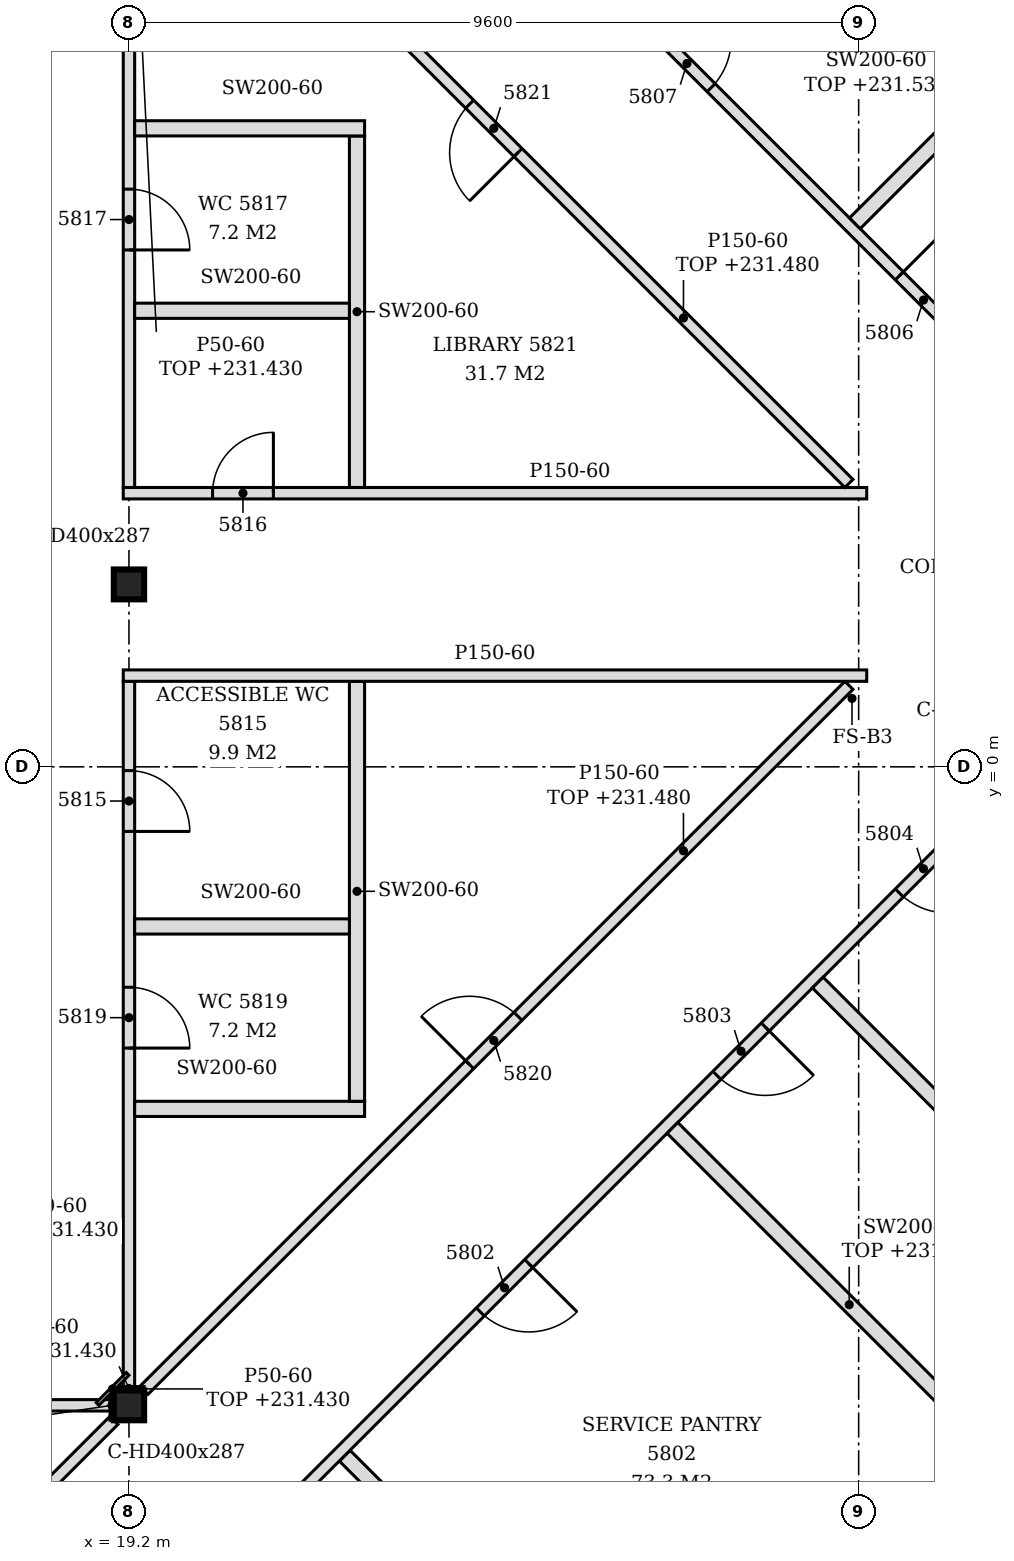
"""IFC4 building model, lengths in metres.
Left out: names, types, materials, properties, quantities, classifications, styles, units other than length and angle.
Written with IfcOpenShell. Run it as: python <this file> out.ifc"""

import sys

from ifc_helpers import new_model, si_unit, direction, frame, frame_2d, origin, origin_2d, place, context, subcontext, project, spatial, polyline, rectangle, i_section, outline, extrude, element, fill, save


model = new_model("IFC4")
c1 = context("Model", 3, precision=1e-05, world=origin(), true_north=direction((0.0, 1.0)))
c2 = subcontext(c1, "Body", "Model", "MODEL_VIEW")
j1 = project(units=[si_unit("LENGTHUNIT", "METRE"), si_unit("PLANEANGLEUNIT", "RADIAN")], contexts=[c1])
p1 = place(None, origin())
s1 = spatial("IfcSite", under=j1, at=p1, CompositionType="ELEMENT")
p2 = place(p1, origin())
s2 = spatial("IfcBuilding", under=s1, at=p2, CompositionType="ELEMENT")
p3 = place(p2, frame((0.0, 0.0, 228.6)))
s3 = spatial("IfcBuildingStorey", under=s2, at=p3, CompositionType="ELEMENT", Elevation=228.6)
for number, where, z_axis, x_axis in (
    (1, (19.2, -8.4, -0.15), (0.0, 0.0, 1.0), (1.0, 0.0, 0.0)),
    (2, (19.2, 2.4, -0.15), (0.0, 0.0, 1.0), (1.0, 0.0, 0.0)),
):
    element("IfcColumn", number, at=place(p3, frame(where, z_axis=z_axis, x_axis=x_axis)), inside=s3, PredefinedType="COLUMN", context=c2, shape_type="SweptSolid", body=[
        extrude(i_section(OverallWidth=0.399, OverallDepth=0.393, WebThickness=0.023, FlangeThickness=0.037, FilletRadius=0.015, at=origin_2d()), origin(), (0.0, 0.0, 1.0), 3.6),
    ])
p4 = place(p3, frame((29.636, -16.66, 0.0), z_axis=(0.0, 0.0, 1.0), x_axis=(-0.707095420673, 0.707118141518, 0.0)))
e3 = element("IfcWall", 3, at=p4, inside=s3, PredefinedType="PARTITIONING", context=c2, shape_type="SweptSolid", body=[
    extrude(rectangle(XDim=10.745, YDim=0.2, at=frame_2d((5.373, 0.0))), origin(), (0.0, 0.0, 1.0), 2.88),
])
p5 = place(p3, frame((16.722, -14.272, 0.0), z_axis=(0.0, 0.0, 1.0), x_axis=(0.707106781187, 0.707106781187, 0.0)))
e4 = element("IfcWall", 4, at=p5, inside=s3, PredefinedType="PARTITIONING", context=c2, shape_type="SweptSolid", body=[
    extrude(rectangle(XDim=20.049, YDim=0.15, at=frame_2d((10.025, 0.0))), origin(), (0.0, 0.0, 1.0), 2.73),
])
p6 = place(p5, frame((4.892, 0.0, 0.0)))
e5 = element("IfcOpeningElement", 5, at=p6, cuts=e4, PredefinedType="OPENING", context=c2, shape_type="SweptSolid", body=[
    extrude(rectangle(XDim=0.9, YDim=2.1, at=frame_2d((0.45, 1.05))), frame((0.0, 0.085, 0.0), z_axis=(0.0, -1.0, 0.0), x_axis=(1.0, 0.0, 0.0)), (0.0, 0.0, 1.0), 0.17),
])
p7 = place(p5, frame((10.042, 0.0, 0.0)))
e6 = element("IfcOpeningElement", 6, at=p7, cuts=e4, PredefinedType="OPENING", context=c2, shape_type="SweptSolid", body=[
    extrude(rectangle(XDim=0.9, YDim=2.1, at=frame_2d((0.45, 1.05))), frame((0.0, 0.085, 0.0), z_axis=(0.0, -1.0, 0.0), x_axis=(1.0, 0.0, 0.0)), (0.0, 0.0, 1.0), 0.17),
])
p8 = place(p5, frame((14.443, 0.0, 0.0)))
e7 = element("IfcOpeningElement", 7, at=p8, cuts=e4, PredefinedType="OPENING", context=c2, shape_type="SweptSolid", body=[
    extrude(rectangle(XDim=0.9, YDim=2.1, at=frame_2d((0.45, 1.05))), frame((0.0, 0.085, 0.0), z_axis=(0.0, -1.0, 0.0), x_axis=(1.0, 0.0, 0.0)), (0.0, 0.0, 1.0), 0.17),
])
p9 = place(p5, frame((17.837, 0.0, 0.0)))
e8 = element("IfcOpeningElement", 8, at=p9, cuts=e4, PredefinedType="OPENING", context=c2, shape_type="SweptSolid", body=[
    extrude(rectangle(XDim=0.9, YDim=2.1, at=frame_2d((0.45, 1.05))), frame((0.0, 0.085, 0.0), z_axis=(0.0, -1.0, 0.0), x_axis=(1.0, 0.0, 0.0)), (0.0, 0.0, 1.0), 0.17),
])
p10 = place(p3, frame((15.728, -11.872, 0.0), z_axis=(0.0, 0.0, 1.0), x_axis=(0.707080416772, 0.707133144618, 0.0)))
e9 = element("IfcWall", 9, at=p10, inside=s3, PredefinedType="PARTITIONING", context=c2, shape_type="SweptSolid", body=[
    extrude(rectangle(XDim=4.63, YDim=0.15, at=frame_2d((2.315, 0.0))), origin(), (0.0, 0.0, 1.0), 3.45),
])
p11 = place(p3, frame((35.86, -10.436, 0.0), z_axis=(0.0, 0.0, 1.0), x_axis=(-0.707106781187, 0.707106781187, 0.0)))
e10 = element("IfcWall", 10, at=p11, inside=s3, PredefinedType="PARTITIONING", context=c2, shape_type="SweptSolid", body=[
    extrude(rectangle(XDim=10.745, YDim=0.2, at=frame_2d((5.373, 0.0))), origin(), (0.0, 0.0, 1.0), 2.88),
])
p12 = place(p3, frame((31.002, -9.402, 0.0), z_axis=(0.0, 0.0, 1.0), x_axis=(-0.707088226093, 0.707125335793, 0.0)))
e11 = element("IfcWall", 11, at=p12, inside=s3, PredefinedType="PARTITIONING", context=c2, shape_type="SweptSolid", body=[
    extrude(rectangle(XDim=6.579, YDim=0.2, at=frame_2d((3.29, 0.0))), origin(), (0.0, 0.0, 1.0), 2.88),
])
p13 = place(p3, frame((7.399, -8.4, 0.0), z_axis=(0.0, 0.0, 1.0), x_axis=(1.0, 0.0, 0.0)))
e12 = element("IfcWall", 12, at=p13, inside=s3, PredefinedType="PARTITIONING", context=c2, shape_type="SweptSolid", body=[
    extrude(rectangle(XDim=11.601, YDim=0.15, at=frame_2d((5.801, 0.0))), origin(), (0.0, 0.0, 1.0), 2.83),
])
p14 = place(p13, frame((5.351, 0.0, 0.0)))
e13 = element("IfcOpeningElement", 13, at=p14, cuts=e12, PredefinedType="OPENING", context=c2, shape_type="SweptSolid", body=[
    extrude(rectangle(XDim=0.9, YDim=2.1, at=frame_2d((0.45, 1.05))), frame((0.0, 0.085, 0.0), z_axis=(0.0, -1.0, 0.0), x_axis=(1.0, 0.0, 0.0)), (0.0, 0.0, 1.0), 0.17),
])
p15 = place(p3, frame((19.2, -8.204, 0.0), z_axis=(0.0, 0.0, 1.0), x_axis=(0.0, 1.0, 0.0)))
e14 = element("IfcWall", 14, at=p15, inside=s3, PredefinedType="PARTITIONING", context=c2, shape_type="SweptSolid", body=[
    extrude(rectangle(XDim=9.329, YDim=0.15, at=frame_2d((4.664, 0.0))), origin(), (0.0, 0.0, 1.0), 2.83),
])
p16 = place(p15, frame((7.354, 0.0, 0.0)))
e15 = element("IfcOpeningElement", 15, at=p16, cuts=e14, PredefinedType="OPENING", context=c2, shape_type="SweptSolid", body=[
    extrude(rectangle(XDim=0.8, YDim=2.1, at=frame_2d((0.4, 1.05))), frame((0.0, 0.085, 0.0), z_axis=(0.0, -1.0, 0.0), x_axis=(1.0, 0.0, 0.0)), (0.0, 0.0, 1.0), 0.17),
])
p17 = place(p15, frame((4.503, 0.0, 0.0)))
e16 = element("IfcOpeningElement", 16, at=p17, cuts=e14, PredefinedType="OPENING", context=c2, shape_type="SweptSolid", body=[
    extrude(rectangle(XDim=0.8, YDim=2.1, at=frame_2d((0.4, 1.05))), frame((0.0, 0.085, 0.0), z_axis=(0.0, -1.0, 0.0), x_axis=(1.0, 0.0, 0.0)), (0.0, 0.0, 1.0), 0.17),
])
p18 = place(p3, frame((19.398, -8.202, 0.0), z_axis=(0.0, 0.0, 1.0), x_axis=(0.707116088468, 0.707097473782, 0.0)))
e17 = element("IfcWall", 17, at=p18, inside=s3, PredefinedType="PARTITIONING", context=c2, shape_type="SweptSolid", body=[
    extrude(rectangle(XDim=13.115, YDim=0.15, at=frame_2d((6.558, 0.0))), origin(), (0.0, 0.0, 1.0), 2.88),
])
p19 = place(p18, frame((6.058, 0.0, 0.0)))
e18 = element("IfcOpeningElement", 18, at=p19, cuts=e17, PredefinedType="OPENING", context=c2, shape_type="SweptSolid", body=[
    extrude(rectangle(XDim=0.9, YDim=2.1, at=frame_2d((0.45, 1.05))), frame((0.0, 0.085, 0.0), z_axis=(0.0, -1.0, 0.0), x_axis=(1.0, 0.0, 0.0)), (0.0, 0.0, 1.0), 0.17),
])
p20 = place(p3, frame((19.275, -4.5, 0.0), z_axis=(0.0, 0.0, 1.0), x_axis=(1.0, 0.0, 0.0)))
e19 = element("IfcWall", 19, at=p20, inside=s3, PredefinedType="PARTITIONING", context=c2, shape_type="SweptSolid", body=[
    extrude(outline(polyline([(0.0, 0.0), (3.025, 0.0), (3.025, 3.45), (0.075, 3.45), (0.073, 2.83), (0.0, 2.83), (0.0, 0.0)])), frame((0.0, 0.1, 0.0), z_axis=(0.0, -1.0, 0.0), x_axis=(1.0, 0.0, 0.0)), (0.0, 0.0, 1.0), 0.2),
])
p21 = place(p3, frame((22.2, -4.4, 0.0), z_axis=(0.0, 0.0, 1.0), x_axis=(0.0, 1.0, 0.0)))
e20 = element("IfcWall", 20, at=p21, inside=s3, PredefinedType="PARTITIONING", context=c2, shape_type="SweptSolid", body=[
    extrude(outline(polyline([(0.0, 0.0), (5.525, 0.0), (5.525, 3.45), (4.505, 3.45), (4.503, 2.88), (4.295, 2.88), (4.293, 3.45), (0.0, 3.45), (0.0, 0.0)])), frame((0.0, 0.1, 0.0), z_axis=(0.0, -1.0, 0.0), x_axis=(1.0, 0.0, 0.0)), (0.0, 0.0, 1.0), 0.2),
])
p22 = place(p3, frame((19.275, -2.1, 0.0), z_axis=(0.0, 0.0, 1.0), x_axis=(1.0, 0.0, 0.0)))
e21 = element("IfcWall", 21, at=p22, inside=s3, PredefinedType="PARTITIONING", context=c2, shape_type="SweptSolid", body=[
    extrude(outline(polyline([(0.0, 0.0), (2.825, 0.0), (2.825, 3.45), (0.075, 3.45), (0.073, 2.83), (0.0, 2.83), (0.0, 0.0)])), frame((0.0, 0.1, 0.0), z_axis=(0.0, -1.0, 0.0), x_axis=(1.0, 0.0, 0.0)), (0.0, 0.0, 1.0), 0.2),
])
p23 = place(p3, frame((19.125, 1.2, 0.0), z_axis=(0.0, 0.0, 1.0), x_axis=(1.0, 0.0, 0.0)))
e22 = element("IfcWall", 22, at=p23, inside=s3, PredefinedType="PARTITIONING", context=c2, shape_type="SweptSolid", body=[
    extrude(outline(polyline([(0.0, 0.0), (9.781, 0.0), (9.781, 3.45), (0.225, 3.45), (0.223, 2.83), (0.0, 2.83), (0.0, 0.0)])), frame((0.0, 0.075, 0.0), z_axis=(0.0, -1.0, 0.0), x_axis=(1.0, 0.0, 0.0)), (0.0, 0.0, 1.0), 0.15),
])
p24 = place(p3, frame((33.341, 2.453, 0.0), z_axis=(0.0, 0.0, 1.0), x_axis=(-0.707098652635, 0.707114909645, 0.0)))
e23 = element("IfcWall", 23, at=p24, inside=s3, PredefinedType="PARTITIONING", context=c2, shape_type="SweptSolid", body=[
    extrude(rectangle(XDim=15.018, YDim=0.15, at=frame_2d((7.509, 0.0))), origin(), (0.0, 0.0, 1.0), 2.88),
])
p25 = place(p24, frame((4.766, 0.0, 0.0)))
e24 = element("IfcOpeningElement", 24, at=p25, cuts=e23, PredefinedType="OPENING", context=c2, shape_type="SweptSolid", body=[
    extrude(rectangle(XDim=0.9, YDim=2.1, at=frame_2d((0.45, 1.05))), frame((0.0, 0.085, 0.0), z_axis=(0.0, -1.0, 0.0), x_axis=(1.0, 0.0, 0.0)), (0.0, 0.0, 1.0), 0.17),
])
p26 = place(p24, frame((9.167, 0.0, 0.0)))
e25 = element("IfcOpeningElement", 25, at=p26, cuts=e23, PredefinedType="OPENING", context=c2, shape_type="SweptSolid", body=[
    extrude(rectangle(XDim=0.9, YDim=2.1, at=frame_2d((0.45, 1.05))), frame((0.0, 0.085, 0.0), z_axis=(0.0, -1.0, 0.0), x_axis=(1.0, 0.0, 0.0)), (0.0, 0.0, 1.0), 0.17),
])
p27 = place(p24, frame((13.482, 0.0, 0.0)))
e26 = element("IfcOpeningElement", 26, at=p27, cuts=e23, PredefinedType="OPENING", context=c2, shape_type="SweptSolid", body=[
    extrude(rectangle(XDim=0.9, YDim=2.1, at=frame_2d((0.45, 1.05))), frame((0.0, 0.085, 0.0), z_axis=(0.0, -1.0, 0.0), x_axis=(1.0, 0.0, 0.0)), (0.0, 0.0, 1.0), 0.17),
])
p28 = place(p3, frame((19.125, 3.6, 0.0), z_axis=(0.0, 0.0, 1.0), x_axis=(1.0, 0.0, 0.0)))
e27 = element("IfcWall", 27, at=p28, inside=s3, PredefinedType="PARTITIONING", context=c2, shape_type="SweptSolid", body=[
    extrude(outline(polyline([(0.0, 0.0), (9.781, 0.0), (9.781, 3.45), (0.225, 3.45), (0.223, 2.83), (0.0, 2.83), (0.0, 0.0)])), frame((0.0, 0.075, 0.0), z_axis=(0.0, -1.0, 0.0), x_axis=(1.0, 0.0, 0.0)), (0.0, 0.0, 1.0), 0.15),
])
p29 = place(p28, frame((1.175, 0.0, 0.0)))
e28 = element("IfcOpeningElement", 28, at=p29, cuts=e27, PredefinedType="OPENING", context=c2, shape_type="SweptSolid", body=[
    extrude(rectangle(XDim=0.8, YDim=2.1, at=frame_2d((0.4, 1.05))), frame((0.0, 0.085, 0.0), z_axis=(0.0, -1.0, 0.0), x_axis=(1.0, 0.0, 0.0)), (0.0, 0.0, 1.0), 0.17),
])
p30 = place(p3, frame((19.2, 3.675, 0.0), z_axis=(0.0, 0.0, 1.0), x_axis=(0.0, 1.0, 0.0)))
e29 = element("IfcWall", 29, at=p30, inside=s3, PredefinedType="PARTITIONING", context=c2, shape_type="SweptSolid", body=[
    extrude(rectangle(XDim=9.328, YDim=0.15, at=frame_2d((4.664, 0.0))), origin(), (0.0, 0.0, 1.0), 2.83),
])
p31 = place(p30, frame((3.125, 0.0, 0.0)))
e30 = element("IfcOpeningElement", 30, at=p31, cuts=e29, PredefinedType="OPENING", context=c2, shape_type="SweptSolid", body=[
    extrude(rectangle(XDim=0.8, YDim=2.1, at=frame_2d((0.4, 1.05))), frame((0.0, 0.085, 0.0), z_axis=(0.0, -1.0, 0.0), x_axis=(1.0, 0.0, 0.0)), (0.0, 0.0, 1.0), 0.17),
])
p32 = place(p3, frame((22.2, 3.675, 0.0), z_axis=(0.0, 0.0, 1.0), x_axis=(0.0, 1.0, 0.0)))
e31 = element("IfcWall", 31, at=p32, inside=s3, PredefinedType="PARTITIONING", context=c2, shape_type="SweptSolid", body=[
    extrude(outline(polyline([(0.0, 0.0), (4.625, 0.0), (4.625, 3.45), (1.23, 3.45), (1.228, 2.88), (1.02, 2.88), (1.018, 3.45), (0.0, 3.45), (0.0, 0.0)])), frame((0.0, 0.1, 0.0), z_axis=(0.0, -1.0, 0.0), x_axis=(1.0, 0.0, 0.0)), (0.0, 0.0, 1.0), 0.2),
])
p33 = place(p3, frame((28.672, 3.728, 0.0), z_axis=(0.0, 0.0, 1.0), x_axis=(-0.707116088468, 0.707097473782, 0.0)))
e32 = element("IfcWall", 32, at=p33, inside=s3, PredefinedType="PARTITIONING", context=c2, shape_type="SweptSolid", body=[
    extrude(rectangle(XDim=13.115, YDim=0.15, at=frame_2d((6.558, 0.0))), origin(), (0.0, 0.0, 1.0), 2.88),
])
p34 = place(p33, frame((6.157, 0.0, 0.0)))
e33 = element("IfcOpeningElement", 33, at=p34, cuts=e32, PredefinedType="OPENING", context=c2, shape_type="SweptSolid", body=[
    extrude(rectangle(XDim=0.9, YDim=2.1, at=frame_2d((0.45, 1.05))), frame((0.0, 0.085, 0.0), z_axis=(0.0, -1.0, 0.0), x_axis=(1.0, 0.0, 0.0)), (0.0, 0.0, 1.0), 0.17),
])
p35 = place(p3, frame((19.275, 6.0, 0.0), z_axis=(0.0, 0.0, 1.0), x_axis=(1.0, 0.0, 0.0)))
e34 = element("IfcWall", 34, at=p35, inside=s3, PredefinedType="PARTITIONING", context=c2, shape_type="SweptSolid", body=[
    extrude(outline(polyline([(0.0, 0.0), (2.825, 0.0), (2.825, 3.45), (0.075, 3.45), (0.073, 2.83), (0.0, 2.83), (0.0, 0.0)])), frame((0.0, 0.1, 0.0), z_axis=(0.0, -1.0, 0.0), x_axis=(1.0, 0.0, 0.0)), (0.0, 0.0, 1.0), 0.2),
])
p36 = place(p3, frame((28.75, 7.15, 0.0), z_axis=(0.0, 0.0, 1.0), x_axis=(0.7070684525, 0.707145107796, 0.0)))
e35 = element("IfcWall", 35, at=p36, inside=s3, PredefinedType="PARTITIONING", context=c2, shape_type="SweptSolid", body=[
    extrude(rectangle(XDim=3.185, YDim=0.2, at=frame_2d((1.592, 0.0))), origin(), (0.0, 0.0, 1.0), 2.93),
])
p37 = place(p3, frame((19.275, 8.4, 0.0), z_axis=(0.0, 0.0, 1.0), x_axis=(1.0, 0.0, 0.0)))
e36 = element("IfcWall", 36, at=p37, inside=s3, PredefinedType="PARTITIONING", context=c2, shape_type="SweptSolid", body=[
    extrude(outline(polyline([(0.0, 0.0), (3.025, 0.0), (3.025, 3.45), (0.075, 3.45), (0.073, 2.83), (0.0, 2.83), (0.0, 0.0)])), frame((0.0, 0.1, 0.0), z_axis=(0.0, -1.0, 0.0), x_axis=(1.0, 0.0, 0.0)), (0.0, 0.0, 1.0), 0.2),
])
p38 = place(p3, frame((18.786, -8.382, 0.0), z_axis=(0.0, 0.0, 1.0), x_axis=(0.707106781187, 0.707106781187, 0.0)))
e37 = element("IfcWall", 37, at=p38, inside=s3, PredefinedType="PARTITIONING", context=c2, shape_type="SweptSolid", body=[
    extrude(rectangle(XDim=0.56, YDim=0.05, at=frame_2d((0.28, 0.0))), origin(), (0.0, 0.0, 1.0), 2.83),
])
p39 = place(p3, frame((19.0, -8.178, 0.0), z_axis=(0.0, 0.0, 1.0), x_axis=(1.0, 0.0, 0.0)))
e38 = element("IfcWall", 38, at=p39, inside=s3, PredefinedType="PARTITIONING", context=c2, shape_type="SweptSolid", body=[
    extrude(rectangle(XDim=0.399, YDim=0.05, at=frame_2d((0.199, 0.0))), origin(), (0.0, 0.0, 1.0), 2.83),
])
p40 = place(p3, frame((18.976, -8.596, 0.0), z_axis=(0.0, 0.0, 1.0), x_axis=(0.0, 1.0, 0.0)))
e39 = element("IfcWall", 39, at=p40, inside=s3, PredefinedType="PARTITIONING", context=c2, shape_type="SweptSolid", body=[
    extrude(rectangle(XDim=0.393, YDim=0.05, at=frame_2d((0.196, 0.0))), origin(), (0.0, 0.0, 1.0), 2.83),
])
p41 = place(p7, frame((0.9, 0.0, 0.0), z_axis=(0.0, 0.0, 1.0), x_axis=(-1.0, 0.0, 0.0)))
e40 = element("IfcDoor", 40, at=p41, inside=s3, OperationType="SINGLE_SWING_LEFT", PredefinedType="DOOR", context=c2, shape_type="SweptSolid", body=[
    extrude(rectangle(XDim=0.9, YDim=2.1, at=frame_2d((0.45, 1.05))), frame((0.0, 0.025, 0.0), z_axis=(0.0, -1.0, 0.0), x_axis=(1.0, 0.0, 0.0)), (0.0, 0.0, 1.0), 0.05),
])
fill(e6, e40)
p42 = place(p8, frame((0.9, 0.0, 0.0), z_axis=(0.0, 0.0, 1.0), x_axis=(-1.0, 0.0, 0.0)))
e41 = element("IfcDoor", 41, at=p42, inside=s3, OperationType="SINGLE_SWING_LEFT", PredefinedType="DOOR", context=c2, shape_type="SweptSolid", body=[
    extrude(rectangle(XDim=0.9, YDim=2.1, at=frame_2d((0.45, 1.05))), frame((0.0, 0.025, 0.0), z_axis=(0.0, -1.0, 0.0), x_axis=(1.0, 0.0, 0.0)), (0.0, 0.0, 1.0), 0.05),
])
fill(e7, e41)
p43 = place(p9, frame((0.9, 0.0, 0.0), z_axis=(0.0, 0.0, 1.0), x_axis=(-1.0, 0.0, 0.0)))
e42 = element("IfcDoor", 42, at=p43, inside=s3, OperationType="SINGLE_SWING_LEFT", PredefinedType="DOOR", context=c2, shape_type="SweptSolid", body=[
    extrude(rectangle(XDim=0.9, YDim=2.1, at=frame_2d((0.45, 1.05))), frame((0.0, 0.025, 0.0), z_axis=(0.0, -1.0, 0.0), x_axis=(1.0, 0.0, 0.0)), (0.0, 0.0, 1.0), 0.05),
])
fill(e8, e42)
p44 = place(p25, frame((0.9, 0.0, 0.0), z_axis=(0.0, 0.0, 1.0), x_axis=(-1.0, 0.0, 0.0)))
e43 = element("IfcDoor", 43, at=p44, inside=s3, OperationType="SINGLE_SWING_LEFT", PredefinedType="DOOR", context=c2, shape_type="SweptSolid", body=[
    extrude(rectangle(XDim=0.9, YDim=2.1, at=frame_2d((0.45, 1.05))), frame((0.0, 0.025, 0.0), z_axis=(0.0, -1.0, 0.0), x_axis=(1.0, 0.0, 0.0)), (0.0, 0.0, 1.0), 0.05),
])
fill(e24, e43)
p45 = place(p26, frame((0.9, 0.0, 0.0), z_axis=(0.0, 0.0, 1.0), x_axis=(-1.0, 0.0, 0.0)))
e44 = element("IfcDoor", 44, at=p45, inside=s3, OperationType="SINGLE_SWING_LEFT", PredefinedType="DOOR", context=c2, shape_type="SweptSolid", body=[
    extrude(rectangle(XDim=0.9, YDim=2.1, at=frame_2d((0.45, 1.05))), frame((0.0, 0.025, 0.0), z_axis=(0.0, -1.0, 0.0), x_axis=(1.0, 0.0, 0.0)), (0.0, 0.0, 1.0), 0.05),
])
fill(e25, e44)
p46 = place(p16, frame((0.8, 0.0, 0.0), z_axis=(0.0, 0.0, 1.0), x_axis=(-1.0, 0.0, 0.0)))
e45 = element("IfcDoor", 45, at=p46, inside=s3, OperationType="SINGLE_SWING_RIGHT", PredefinedType="DOOR", context=c2, shape_type="SweptSolid", body=[
    extrude(rectangle(XDim=0.8, YDim=2.1, at=frame_2d((0.4, 1.05))), frame((0.0, 0.025, 0.0), z_axis=(0.0, -1.0, 0.0), x_axis=(1.0, 0.0, 0.0)), (0.0, 0.0, 1.0), 0.05),
])
fill(e15, e45)
p47 = place(p29, origin())
e46 = element("IfcDoor", 46, at=p47, inside=s3, OperationType="SINGLE_SWING_RIGHT", PredefinedType="DOOR", context=c2, shape_type="SweptSolid", body=[
    extrude(rectangle(XDim=0.8, YDim=2.1, at=frame_2d((0.4, 1.05))), frame((0.0, 0.025, 0.0), z_axis=(0.0, -1.0, 0.0), x_axis=(1.0, 0.0, 0.0)), (0.0, 0.0, 1.0), 0.05),
])
fill(e28, e46)
p48 = place(p31, frame((0.8, 0.0, 0.0), z_axis=(0.0, 0.0, 1.0), x_axis=(-1.0, 0.0, 0.0)))
e47 = element("IfcDoor", 47, at=p48, inside=s3, OperationType="SINGLE_SWING_RIGHT", PredefinedType="DOOR", context=c2, shape_type="SweptSolid", body=[
    extrude(rectangle(XDim=0.8, YDim=2.1, at=frame_2d((0.4, 1.05))), frame((0.0, 0.025, 0.0), z_axis=(0.0, -1.0, 0.0), x_axis=(1.0, 0.0, 0.0)), (0.0, 0.0, 1.0), 0.05),
])
fill(e30, e47)
p49 = place(p17, frame((0.8, 0.0, 0.0), z_axis=(0.0, 0.0, 1.0), x_axis=(-1.0, 0.0, 0.0)))
e48 = element("IfcDoor", 48, at=p49, inside=s3, OperationType="SINGLE_SWING_RIGHT", PredefinedType="DOOR", context=c2, shape_type="SweptSolid", body=[
    extrude(rectangle(XDim=0.8, YDim=2.1, at=frame_2d((0.4, 1.05))), frame((0.0, 0.025, 0.0), z_axis=(0.0, -1.0, 0.0), x_axis=(1.0, 0.0, 0.0)), (0.0, 0.0, 1.0), 0.05),
])
fill(e16, e48)
p50 = place(p19, origin())
e49 = element("IfcDoor", 49, at=p50, inside=s3, OperationType="SINGLE_SWING_LEFT", PredefinedType="DOOR", context=c2, shape_type="SweptSolid", body=[
    extrude(rectangle(XDim=0.9, YDim=2.1, at=frame_2d((0.45, 1.05))), frame((0.0, 0.025, 0.0), z_axis=(0.0, -1.0, 0.0), x_axis=(1.0, 0.0, 0.0)), (0.0, 0.0, 1.0), 0.05),
])
fill(e18, e49)
p51 = place(p34, origin())
e50 = element("IfcDoor", 50, at=p51, inside=s3, OperationType="SINGLE_SWING_LEFT", PredefinedType="DOOR", context=c2, shape_type="SweptSolid", body=[
    extrude(rectangle(XDim=0.9, YDim=2.1, at=frame_2d((0.45, 1.05))), frame((0.0, 0.025, 0.0), z_axis=(0.0, -1.0, 0.0), x_axis=(1.0, 0.0, 0.0)), (0.0, 0.0, 1.0), 0.05),
])
fill(e33, e50)
save(model, sys.argv[1])
